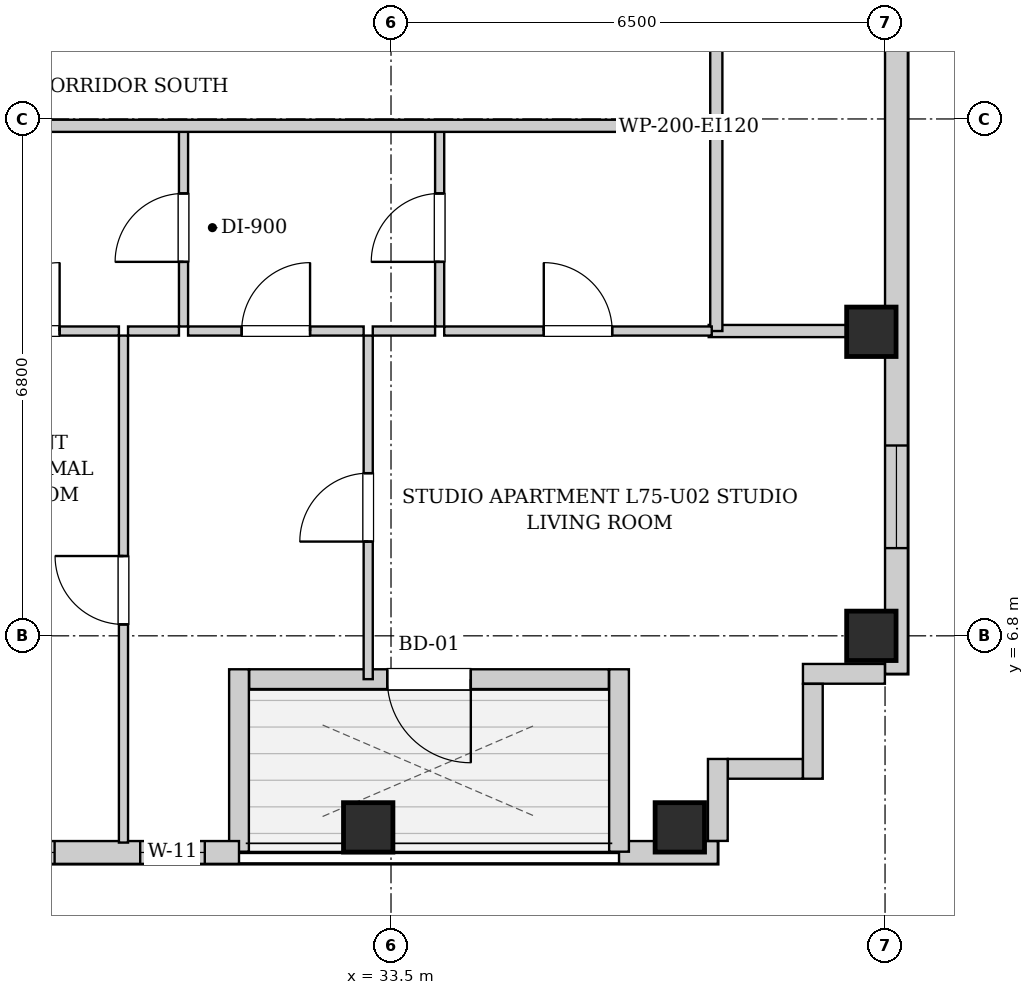
"""IFC4 building model, lengths in metres.
Left out: names, types, materials, properties, quantities, classifications, styles, units other than length and angle.
Written with IfcOpenShell. Run it as: python <this file> out.ifc"""

import sys

from ifc_helpers import new_model, si_unit, direction, frame, frame_2d, origin, origin_2d, place, context, subcontext, project, spatial, rectangle, extrude, element, fill, save


model = new_model("IFC4")
c1 = context("Model", 3, precision=1e-05, world=origin(), true_north=direction((0.0, 1.0)))
c2 = subcontext(c1, "Body", "Model", "MODEL_VIEW")
j1 = project(units=[si_unit("LENGTHUNIT", "METRE"), si_unit("PLANEANGLEUNIT", "RADIAN")], contexts=[c1])
p1 = place(None, origin())
s1 = spatial("IfcSite", under=j1, at=p1, CompositionType="ELEMENT")
p2 = place(p1, origin())
s2 = spatial("IfcBuilding", under=s1, at=p2, CompositionType="ELEMENT")
p3 = place(p2, frame((0.0, 0.0, 258.1)))
s3 = spatial("IfcBuildingStorey", under=s2, at=p3, CompositionType="ELEMENT", Elevation=258.1)
for number, where, z_axis, x_axis in (
    (1, (33.2, 4.28, 0.0), (0.0, 0.0, 1.0), (1.0, 0.0, 0.0)),
    (2, (37.3, 4.28, 0.0), (0.0, 0.0, 1.0), (1.0, 0.0, 0.0)),
    (3, (39.82, 6.8, 0.0), (0.0, 0.0, 1.0), (1.0, 0.0, 0.0)),
    (4, (39.82, 10.8, 0.0), (0.0, 0.0, 1.0), (1.0, 0.0, 0.0)),
):
    element("IfcColumn", number, at=place(p3, frame(where, z_axis=z_axis, x_axis=x_axis)), inside=s3, PredefinedType="COLUMN", context=c2, shape_type="SweptSolid", body=[
        extrude(rectangle(XDim=0.65, YDim=0.65, at=origin_2d()), origin(), (0.0, 0.0, 1.0), 3.4),
    ])
p4 = place(p3, frame((40.15, 37.7, 0.0), z_axis=(0.0, 0.0, 1.0), x_axis=(0.0, -1.0, 0.0)))
e5 = element("IfcWall", 5, at=p4, inside=s3, PredefinedType="SOLIDWALL", context=c2, shape_type="SweptSolid", body=[
    extrude(rectangle(XDim=31.4, YDim=0.3, at=frame_2d((15.7, 0.0))), origin(), (0.0, 0.0, 1.0), 3.05),
])
p5 = place(p4, frame((28.396, 0.0, 0.55)))
e6 = element("IfcOpeningElement", 6, at=p5, cuts=e5, PredefinedType="OPENING", context=c2, shape_type="SweptSolid", body=[
    extrude(rectangle(XDim=1.35, YDim=1.2, at=frame_2d((0.675, 0.6))), frame((0.0, 0.16, 0.0), z_axis=(0.0, -1.0, 0.0), x_axis=(1.0, 0.0, 0.0)), (0.0, 0.0, 1.0), 0.32),
])
p6 = place(p4, frame((1.653, 0.0, 0.55)))
e7 = element("IfcOpeningElement", 7, at=p6, cuts=e5, PredefinedType="OPENING", context=c2, shape_type="SweptSolid", body=[
    extrude(rectangle(XDim=1.35, YDim=1.2, at=frame_2d((0.675, 0.6))), frame((0.0, 0.16, 0.0), z_axis=(0.0, -1.0, 0.0), x_axis=(1.0, 0.0, 0.0)), (0.0, 0.0, 1.0), 0.32),
])
p7 = place(p4, frame((19.683, 0.0, 0.55)))
e8 = element("IfcOpeningElement", 8, at=p7, cuts=e5, PredefinedType="OPENING", context=c2, shape_type="SweptSolid", body=[
    extrude(rectangle(XDim=1.35, YDim=1.2, at=frame_2d((0.675, 0.6))), frame((0.0, 0.16, 0.0), z_axis=(0.0, -1.0, 0.0), x_axis=(1.0, 0.0, 0.0)), (0.0, 0.0, 1.0), 0.32),
])
p8 = place(p4, frame((10.367, 0.0, 0.55)))
e9 = element("IfcOpeningElement", 9, at=p8, cuts=e5, PredefinedType="OPENING", context=c2, shape_type="SweptSolid", body=[
    extrude(rectangle(XDim=1.35, YDim=1.2, at=frame_2d((0.675, 0.6))), frame((0.0, 0.16, 0.0), z_axis=(0.0, -1.0, 0.0), x_axis=(1.0, 0.0, 0.0)), (0.0, 0.0, 1.0), 0.32),
])
p9 = place(p3, frame((37.8, 3.95, 0.0), z_axis=(0.0, 0.0, 1.0), x_axis=(-1.0, 0.0, 0.0)))
e10 = element("IfcWall", 10, at=p9, inside=s3, PredefinedType="SOLIDWALL", context=c2, shape_type="SweptSolid", body=[
    extrude(rectangle(XDim=1.3, YDim=0.3, at=frame_2d((0.65, 0.0))), origin(), (0.0, 0.0, 1.0), 3.05),
])
p10 = place(p3, frame((36.5, 3.96, 0.0), z_axis=(0.0, 0.0, 1.0), x_axis=(0.0, 1.0, 0.0)))
e11 = element("IfcWall", 11, at=p10, inside=s3, PredefinedType="SOLIDWALL", context=c2, shape_type="SweptSolid", body=[
    extrude(rectangle(XDim=2.4, YDim=0.26, at=frame_2d((1.2, 0.0))), origin(), (0.0, 0.0, 1.0), 3.05),
])
p11 = place(p3, frame((36.366, 6.23, 0.0), z_axis=(0.0, 0.0, 1.0), x_axis=(-1.0, 0.0, 0.0)))
e12 = element("IfcWall", 12, at=p11, inside=s3, PredefinedType="SOLIDWALL", context=c2, shape_type="SweptSolid", body=[
    extrude(rectangle(XDim=4.732, YDim=0.26, at=frame_2d((2.366, 0.0))), origin(), (0.0, 0.0, 1.0), 3.05),
])
p12 = place(p11, frame((1.816, 0.0, 0.0)))
e13 = element("IfcOpeningElement", 13, at=p12, cuts=e12, PredefinedType="OPENING", context=c2, shape_type="SweptSolid", body=[
    extrude(rectangle(XDim=1.1, YDim=2.0, at=frame_2d((0.55, 1.0))), frame((0.0, 0.14, 0.0), z_axis=(0.0, -1.0, 0.0), x_axis=(1.0, 0.0, 0.0)), (0.0, 0.0, 1.0), 0.28),
])
p13 = place(p3, frame((31.5, 6.36, 0.0), z_axis=(0.0, 0.0, 1.0), x_axis=(0.0, -1.0, 0.0)))
e14 = element("IfcWall", 14, at=p13, inside=s3, PredefinedType="SOLIDWALL", context=c2, shape_type="SweptSolid", body=[
    extrude(rectangle(XDim=2.4, YDim=0.26, at=frame_2d((1.2, 0.0))), origin(), (0.0, 0.0, 1.0), 3.05),
])
p14 = place(p3, frame((31.5, 3.95, 0.0), z_axis=(0.0, 0.0, 1.0), x_axis=(-1.0, 0.0, 0.0)))
e15 = element("IfcWall", 15, at=p14, inside=s3, PredefinedType="SOLIDWALL", context=c2, shape_type="SweptSolid", body=[
    extrude(rectangle(XDim=11.95, YDim=0.3, at=frame_2d((5.975, 0.0))), origin(), (0.0, 0.0, 1.0), 3.05),
])
p15 = place(p14, frame((9.0, 0.0, 0.55)))
e16 = element("IfcOpeningElement", 16, at=p15, cuts=e15, PredefinedType="OPENING", context=c2, shape_type="SweptSolid", body=[
    extrude(rectangle(XDim=1.35, YDim=1.2, at=frame_2d((0.675, 0.6))), frame((0.0, 0.16, 0.0), z_axis=(0.0, -1.0, 0.0), x_axis=(1.0, 0.0, 0.0)), (0.0, 0.0, 1.0), 0.32),
])
p16 = place(p14, frame((2.426, 0.0, 0.55)))
e17 = element("IfcOpeningElement", 17, at=p16, cuts=e15, PredefinedType="OPENING", context=c2, shape_type="SweptSolid", body=[
    extrude(rectangle(XDim=1.35, YDim=1.2, at=frame_2d((0.675, 0.6))), frame((0.0, 0.16, 0.0), z_axis=(0.0, -1.0, 0.0), x_axis=(1.0, 0.0, 0.0)), (0.0, 0.0, 1.0), 0.32),
])
p17 = place(p14, frame((0.45, 0.0, 0.55)))
e18 = element("IfcOpeningElement", 18, at=p17, cuts=e15, PredefinedType="OPENING", context=c2, shape_type="SweptSolid", body=[
    extrude(rectangle(XDim=0.85, YDim=1.2, at=frame_2d((0.425, 0.6))), frame((0.0, 0.16, 0.0), z_axis=(0.0, -1.0, 0.0), x_axis=(1.0, 0.0, 0.0)), (0.0, 0.0, 1.0), 0.32),
])
p18 = place(p3, frame((39.998, 6.3, 0.0), z_axis=(0.0, 0.0, 1.0), x_axis=(-1.0, 0.0, 0.0)))
e19 = element("IfcWall", 19, at=p18, inside=s3, PredefinedType="SOLIDWALL", context=c2, shape_type="SweptSolid", body=[
    extrude(rectangle(XDim=1.078, YDim=0.26, at=frame_2d((0.539, 0.0))), origin(), (0.0, 0.0, 1.0), 3.05),
])
p19 = place(p3, frame((39.05, 6.168, 0.0), z_axis=(0.0, 0.0, 1.0), x_axis=(0.0, -1.0, 0.0)))
e20 = element("IfcWall", 20, at=p19, inside=s3, PredefinedType="SOLIDWALL", context=c2, shape_type="SweptSolid", body=[
    extrude(rectangle(XDim=1.248, YDim=0.26, at=frame_2d((0.624, 0.0))), origin(), (0.0, 0.0, 1.0), 3.05),
])
p20 = place(p3, frame((38.918, 5.05, 0.0), z_axis=(0.0, 0.0, 1.0), x_axis=(-1.0, 0.0, 0.0)))
e21 = element("IfcWall", 21, at=p20, inside=s3, PredefinedType="SOLIDWALL", context=c2, shape_type="SweptSolid", body=[
    extrude(rectangle(XDim=0.986, YDim=0.26, at=frame_2d((0.493, 0.0))), origin(), (0.0, 0.0, 1.0), 3.05),
])
p21 = place(p3, frame((37.8, 5.18, 0.0), z_axis=(0.0, 0.0, 1.0), x_axis=(0.0, -1.0, 0.0)))
e22 = element("IfcWall", 22, at=p21, inside=s3, PredefinedType="SOLIDWALL", context=c2, shape_type="SweptSolid", body=[
    extrude(rectangle(XDim=1.078, YDim=0.26, at=frame_2d((0.539, 0.0))), origin(), (0.0, 0.0, 1.0), 3.05),
])
p22 = place(p3, frame((37.78, 13.51, 0.0), z_axis=(0.0, 0.0, 1.0), x_axis=(0.0, 1.0, 0.0)))
e23 = element("IfcWall", 23, at=p22, inside=s3, PredefinedType="PARTITIONING", context=c2, shape_type="SweptSolid", body=[
    extrude(rectangle(XDim=1.58, YDim=0.16, at=frame_2d((0.79, 0.0))), origin(), (0.0, 0.0, 1.0), 3.05),
])
p23 = place(p3, frame((37.68, 10.81, 0.0), z_axis=(0.0, 0.0, 1.0), x_axis=(1.0, 0.0, 0.0)))
e24 = element("IfcWall", 24, at=p23, inside=s3, PredefinedType="PARTITIONING", context=c2, shape_type="SweptSolid", body=[
    extrude(rectangle(XDim=2.34, YDim=0.16, at=frame_2d((1.17, 0.0))), origin(), (0.0, 0.0, 1.0), 3.05),
])
p24 = place(p3, frame((37.78, 10.81, 0.0), z_axis=(0.0, 0.0, 1.0), x_axis=(0.0, 1.0, 0.0)))
e25 = element("IfcWall", 25, at=p24, inside=s3, PredefinedType="PARTITIONING", context=c2, shape_type="SweptSolid", body=[
    extrude(rectangle(XDim=2.66, YDim=0.16, at=frame_2d((1.33, 0.0))), origin(), (0.0, 0.0, 1.0), 3.05),
])
p25 = place(p3, frame((30.77, 10.87, 0.0), z_axis=(0.0, 0.0, 1.0), x_axis=(0.0, 1.0, 0.0)))
e26 = element("IfcWall", 26, at=p25, inside=s3, PredefinedType="PARTITIONING", context=c2, shape_type="SweptSolid", body=[
    extrude(rectangle(XDim=2.6, YDim=0.12, at=frame_2d((1.3, 0.0))), origin(), (0.0, 0.0, 1.0), 3.05),
])
p26 = place(p25, frame((0.85, 0.0, 0.0)))
e27 = element("IfcOpeningElement", 27, at=p26, cuts=e26, PredefinedType="OPENING", context=c2, shape_type="SweptSolid", body=[
    extrude(rectangle(XDim=0.9, YDim=2.05, at=frame_2d((0.45, 1.025))), frame((0.0, 0.07, 0.0), z_axis=(0.0, -1.0, 0.0), x_axis=(1.0, 0.0, 0.0)), (0.0, 0.0, 1.0), 0.14),
])
p27 = place(p3, frame((27.46, 10.81, 0.0), z_axis=(0.0, 0.0, 1.0), x_axis=(1.0, 0.0, 0.0)))
e28 = element("IfcWall", 28, at=p27, inside=s3, PredefinedType="PARTITIONING", context=c2, shape_type="SweptSolid", body=[
    extrude(rectangle(XDim=2.46, YDim=0.12, at=frame_2d((1.23, 0.0))), origin(), (0.0, 0.0, 1.0), 3.05),
])
p28 = place(p27, frame((0.78, 0.0, 0.0)))
e29 = element("IfcOpeningElement", 29, at=p28, cuts=e28, PredefinedType="OPENING", context=c2, shape_type="SweptSolid", body=[
    extrude(rectangle(XDim=0.9, YDim=2.05, at=frame_2d((0.45, 1.025))), frame((0.0, 0.07, 0.0), z_axis=(0.0, -1.0, 0.0), x_axis=(1.0, 0.0, 0.0)), (0.0, 0.0, 1.0), 0.14),
])
p29 = place(p3, frame((30.04, 10.81, 0.0), z_axis=(0.0, 0.0, 1.0), x_axis=(1.0, 0.0, 0.0)))
e30 = element("IfcWall", 30, at=p29, inside=s3, PredefinedType="PARTITIONING", context=c2, shape_type="SweptSolid", body=[
    extrude(rectangle(XDim=0.67, YDim=0.12, at=frame_2d((0.335, 0.0))), origin(), (0.0, 0.0, 1.0), 3.05),
])
p30 = place(p3, frame((34.14, 10.87, 0.0), z_axis=(0.0, 0.0, 1.0), x_axis=(0.0, 1.0, 0.0)))
e31 = element("IfcWall", 31, at=p30, inside=s3, PredefinedType="PARTITIONING", context=c2, shape_type="SweptSolid", body=[
    extrude(rectangle(XDim=2.6, YDim=0.12, at=frame_2d((1.3, 0.0))), origin(), (0.0, 0.0, 1.0), 3.05),
])
p31 = place(p30, frame((0.85, 0.0, 0.0)))
e32 = element("IfcOpeningElement", 32, at=p31, cuts=e31, PredefinedType="OPENING", context=c2, shape_type="SweptSolid", body=[
    extrude(rectangle(XDim=0.9, YDim=2.05, at=frame_2d((0.45, 1.025))), frame((0.0, 0.07, 0.0), z_axis=(0.0, -1.0, 0.0), x_axis=(1.0, 0.0, 0.0)), (0.0, 0.0, 1.0), 0.14),
])
p32 = place(p3, frame((30.83, 10.81, 0.0), z_axis=(0.0, 0.0, 1.0), x_axis=(1.0, 0.0, 0.0)))
e33 = element("IfcWall", 33, at=p32, inside=s3, PredefinedType="PARTITIONING", context=c2, shape_type="SweptSolid", body=[
    extrude(rectangle(XDim=2.31, YDim=0.12, at=frame_2d((1.155, 0.0))), origin(), (0.0, 0.0, 1.0), 3.05),
])
p33 = place(p32, frame((0.705, 0.0, 0.0)))
e34 = element("IfcOpeningElement", 34, at=p33, cuts=e33, PredefinedType="OPENING", context=c2, shape_type="SweptSolid", body=[
    extrude(rectangle(XDim=0.9, YDim=2.05, at=frame_2d((0.45, 1.025))), frame((0.0, 0.07, 0.0), z_axis=(0.0, -1.0, 0.0), x_axis=(1.0, 0.0, 0.0)), (0.0, 0.0, 1.0), 0.14),
])
p34 = place(p3, frame((33.26, 10.81, 0.0), z_axis=(0.0, 0.0, 1.0), x_axis=(1.0, 0.0, 0.0)))
e35 = element("IfcWall", 35, at=p34, inside=s3, PredefinedType="PARTITIONING", context=c2, shape_type="SweptSolid", body=[
    extrude(rectangle(XDim=0.82, YDim=0.12, at=frame_2d((0.41, 0.0))), origin(), (0.0, 0.0, 1.0), 3.05),
])
p35 = place(p3, frame((34.2, 10.81, 0.0), z_axis=(0.0, 0.0, 1.0), x_axis=(1.0, 0.0, 0.0)))
e36 = element("IfcWall", 36, at=p35, inside=s3, PredefinedType="PARTITIONING", context=c2, shape_type="SweptSolid", body=[
    extrude(rectangle(XDim=3.52, YDim=0.12, at=frame_2d((1.76, 0.0))), origin(), (0.0, 0.0, 1.0), 3.05),
])
p36 = place(p35, frame((1.31, 0.0, 0.0)))
e37 = element("IfcOpeningElement", 37, at=p36, cuts=e36, PredefinedType="OPENING", context=c2, shape_type="SweptSolid", body=[
    extrude(rectangle(XDim=0.9, YDim=2.05, at=frame_2d((0.45, 1.025))), frame((0.0, 0.07, 0.0), z_axis=(0.0, -1.0, 0.0), x_axis=(1.0, 0.0, 0.0)), (0.0, 0.0, 1.0), 0.14),
])
p37 = place(p3, frame((29.98, 4.08, 0.0), z_axis=(0.0, 0.0, 1.0), x_axis=(0.0, 1.0, 0.0)))
e38 = element("IfcWall", 38, at=p37, inside=s3, PredefinedType="PARTITIONING", context=c2, shape_type="SweptSolid", body=[
    extrude(rectangle(XDim=6.67, YDim=0.12, at=frame_2d((3.335, 0.0))), origin(), (0.0, 0.0, 1.0), 3.05),
])
p38 = place(p37, frame((2.87, 0.0, 0.0)))
e39 = element("IfcOpeningElement", 39, at=p38, cuts=e38, PredefinedType="OPENING", context=c2, shape_type="SweptSolid", body=[
    extrude(rectangle(XDim=0.9, YDim=2.05, at=frame_2d((0.45, 1.025))), frame((0.0, 0.07, 0.0), z_axis=(0.0, -1.0, 0.0), x_axis=(1.0, 0.0, 0.0)), (0.0, 0.0, 1.0), 0.14),
])
p39 = place(p3, frame((33.2, 6.23, 0.0), z_axis=(0.0, 0.0, 1.0), x_axis=(0.0, 1.0, 0.0)))
e40 = element("IfcWall", 40, at=p39, inside=s3, PredefinedType="PARTITIONING", context=c2, shape_type="SweptSolid", body=[
    extrude(rectangle(XDim=4.52, YDim=0.12, at=frame_2d((2.26, 0.0))), origin(), (0.0, 0.0, 1.0), 2.578),
])
p40 = place(p39, frame((1.81, 0.0, 0.0)))
e41 = element("IfcOpeningElement", 41, at=p40, cuts=e40, PredefinedType="OPENING", context=c2, shape_type="SweptSolid", body=[
    extrude(rectangle(XDim=0.9, YDim=2.05, at=frame_2d((0.45, 1.025))), frame((0.0, 0.07, 0.0), z_axis=(0.0, -1.0, 0.0), x_axis=(1.0, 0.0, 0.0)), (0.0, 0.0, 1.0), 0.14),
])
p41 = place(p3, frame((13.15, 13.51, 0.0), z_axis=(0.0, 0.0, 1.0), x_axis=(1.0, 0.0, 0.0)))
e42 = element("IfcWall", 42, at=p41, inside=s3, PredefinedType="PARTITIONING", context=c2, shape_type="SweptSolid", body=[
    extrude(rectangle(XDim=24.6, YDim=0.16, at=frame_2d((12.3, 0.0))), origin(), (0.0, 0.0, 1.0), 3.05),
])
p42 = place(p41, frame((5.185, 0.0, 0.0)))
e43 = element("IfcOpeningElement", 43, at=p42, cuts=e42, PredefinedType="OPENING", context=c2, shape_type="SweptSolid", body=[
    extrude(rectangle(XDim=0.95, YDim=2.1, at=frame_2d((0.475, 1.05))), frame((0.0, 0.09, 0.0), z_axis=(0.0, -1.0, 0.0), x_axis=(1.0, 0.0, 0.0)), (0.0, 0.0, 1.0), 0.18),
])
p43 = place(p41, frame((11.495, 0.0, 0.0)))
e44 = element("IfcOpeningElement", 44, at=p43, cuts=e42, PredefinedType="OPENING", context=c2, shape_type="SweptSolid", body=[
    extrude(rectangle(XDim=0.95, YDim=2.1, at=frame_2d((0.475, 1.05))), frame((0.0, 0.09, 0.0), z_axis=(0.0, -1.0, 0.0), x_axis=(1.0, 0.0, 0.0)), (0.0, 0.0, 1.0), 0.18),
])
p44 = place(p26, origin())
e45 = element("IfcDoor", 45, at=p44, inside=s3, OperationType="SINGLE_SWING_LEFT", PredefinedType="DOOR", context=c2, shape_type="SweptSolid", body=[
    extrude(rectangle(XDim=0.9, YDim=2.05, at=frame_2d((0.45, 1.025))), frame((0.0, 0.025, 0.0), z_axis=(0.0, -1.0, 0.0), x_axis=(1.0, 0.0, 0.0)), (0.0, 0.0, 1.0), 0.05),
])
fill(e27, e45)
p45 = place(p28, origin())
e46 = element("IfcDoor", 46, at=p45, inside=s3, OperationType="SINGLE_SWING_RIGHT", PredefinedType="DOOR", context=c2, shape_type="SweptSolid", body=[
    extrude(rectangle(XDim=0.9, YDim=2.05, at=frame_2d((0.45, 1.025))), frame((0.0, 0.025, 0.0), z_axis=(0.0, -1.0, 0.0), x_axis=(1.0, 0.0, 0.0)), (0.0, 0.0, 1.0), 0.05),
])
fill(e29, e46)
p46 = place(p31, origin())
e47 = element("IfcDoor", 47, at=p46, inside=s3, OperationType="SINGLE_SWING_LEFT", PredefinedType="DOOR", context=c2, shape_type="SweptSolid", body=[
    extrude(rectangle(XDim=0.9, YDim=2.05, at=frame_2d((0.45, 1.025))), frame((0.0, 0.025, 0.0), z_axis=(0.0, -1.0, 0.0), x_axis=(1.0, 0.0, 0.0)), (0.0, 0.0, 1.0), 0.05),
])
fill(e32, e47)
p47 = place(p33, origin())
e48 = element("IfcDoor", 48, at=p47, inside=s3, OperationType="SINGLE_SWING_RIGHT", PredefinedType="DOOR", context=c2, shape_type="SweptSolid", body=[
    extrude(rectangle(XDim=0.9, YDim=2.05, at=frame_2d((0.45, 1.025))), frame((0.0, 0.025, 0.0), z_axis=(0.0, -1.0, 0.0), x_axis=(1.0, 0.0, 0.0)), (0.0, 0.0, 1.0), 0.05),
])
fill(e34, e48)
p48 = place(p36, origin())
e49 = element("IfcDoor", 49, at=p48, inside=s3, OperationType="SINGLE_SWING_LEFT", PredefinedType="DOOR", context=c2, shape_type="SweptSolid", body=[
    extrude(rectangle(XDim=0.9, YDim=2.05, at=frame_2d((0.45, 1.025))), frame((0.0, 0.025, 0.0), z_axis=(0.0, -1.0, 0.0), x_axis=(1.0, 0.0, 0.0)), (0.0, 0.0, 1.0), 0.05),
])
fill(e37, e49)
p49 = place(p38, origin())
e50 = element("IfcDoor", 50, at=p49, inside=s3, OperationType="SINGLE_SWING_RIGHT", PredefinedType="DOOR", context=c2, shape_type="SweptSolid", body=[
    extrude(rectangle(XDim=0.9, YDim=2.05, at=frame_2d((0.45, 1.025))), frame((0.0, 0.025, 0.0), z_axis=(0.0, -1.0, 0.0), x_axis=(1.0, 0.0, 0.0)), (0.0, 0.0, 1.0), 0.05),
])
fill(e39, e50)
p50 = place(p40, origin())
e51 = element("IfcDoor", 51, at=p50, inside=s3, OperationType="SINGLE_SWING_LEFT", PredefinedType="DOOR", context=c2, shape_type="SweptSolid", body=[
    extrude(rectangle(XDim=0.9, YDim=2.05, at=frame_2d((0.45, 1.025))), frame((0.0, 0.025, 0.0), z_axis=(0.0, -1.0, 0.0), x_axis=(1.0, 0.0, 0.0)), (0.0, 0.0, 1.0), 0.05),
])
fill(e41, e51)
p51 = place(p12, origin())
e52 = element("IfcDoor", 52, at=p51, inside=s3, OperationType="SINGLE_SWING_LEFT", PredefinedType="DOOR", context=c2, shape_type="SweptSolid", body=[
    extrude(rectangle(XDim=1.1, YDim=2.0, at=frame_2d((0.55, 1.0))), frame((0.0, 0.025, 0.0), z_axis=(0.0, -1.0, 0.0), x_axis=(1.0, 0.0, 0.0)), (0.0, 0.0, 1.0), 0.05),
])
fill(e13, e52)
p52 = place(p16, origin())
e53 = element("IfcWindow", 53, at=p52, inside=s3, PartitioningType="SINGLE_PANEL", PredefinedType="WINDOW", context=c2, shape_type="SweptSolid", body=[
    extrude(rectangle(XDim=1.35, YDim=1.2, at=frame_2d((0.675, 0.6))), frame((0.0, 0.03, 0.0), z_axis=(0.0, -1.0, 0.0), x_axis=(1.0, 0.0, 0.0)), (0.0, 0.0, 1.0), 0.06),
])
fill(e17, e53)
p53 = place(p17, origin())
e54 = element("IfcWindow", 54, at=p53, inside=s3, PartitioningType="SINGLE_PANEL", PredefinedType="WINDOW", context=c2, shape_type="SweptSolid", body=[
    extrude(rectangle(XDim=0.85, YDim=1.2, at=frame_2d((0.425, 0.6))), frame((0.0, 0.03, 0.0), z_axis=(0.0, -1.0, 0.0), x_axis=(1.0, 0.0, 0.0)), (0.0, 0.0, 1.0), 0.06),
])
fill(e18, e54)
p54 = place(p5, origin())
e55 = element("IfcWindow", 55, at=p54, inside=s3, PartitioningType="SINGLE_PANEL", PredefinedType="WINDOW", context=c2, shape_type="SweptSolid", body=[
    extrude(rectangle(XDim=1.35, YDim=1.2, at=frame_2d((0.675, 0.6))), frame((0.0, 0.03, 0.0), z_axis=(0.0, -1.0, 0.0), x_axis=(1.0, 0.0, 0.0)), (0.0, 0.0, 1.0), 0.06),
])
fill(e6, e55)
save(model, sys.argv[1])
